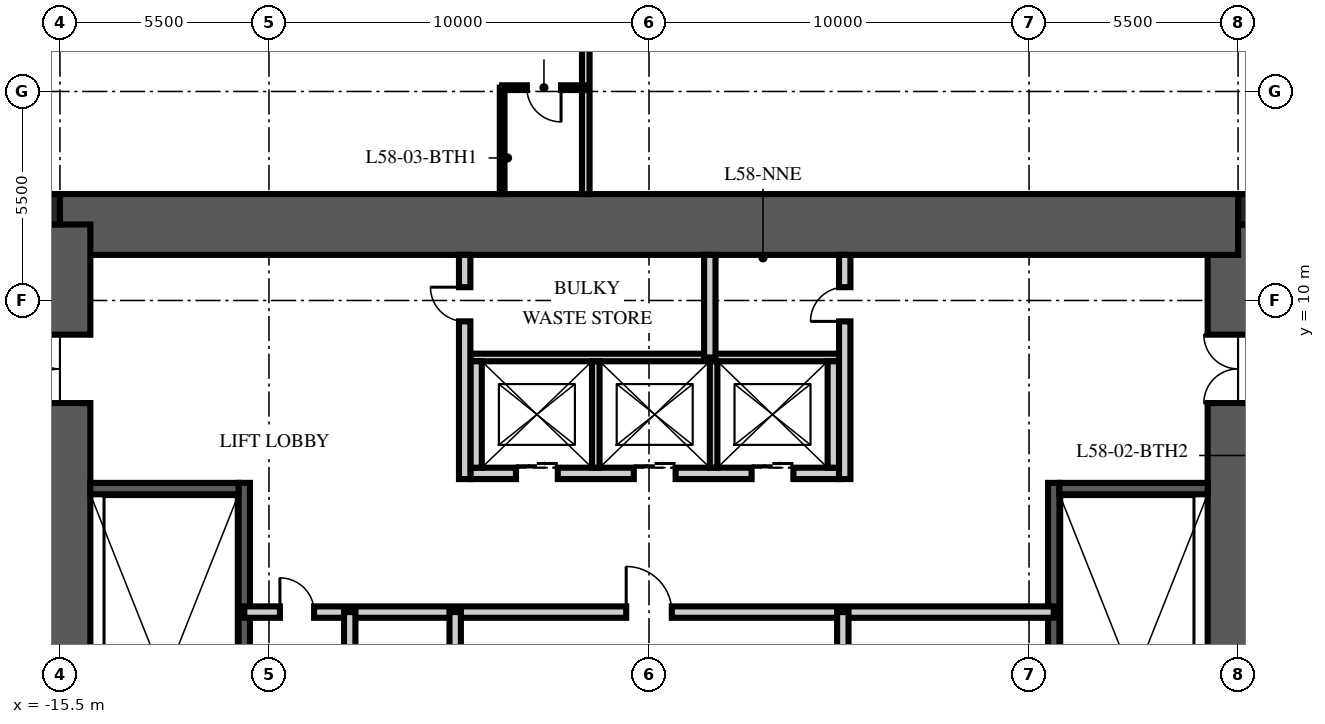
"""IFC4 building model, lengths in metres.
Left out: names, types, materials, properties, quantities, classifications, styles, units other than length and angle.
Written with IfcOpenShell. Run it as: python <this file> out.ifc"""

import sys

from ifc_helpers import new_model, si_unit, direction, frame, frame_2d, origin, origin_2d, place, context, subcontext, project, spatial, rectangle, extrude, element, fill, save


model = new_model("IFC4")
c1 = context("Model", 3, precision=1e-05, world=origin(), true_north=direction((0.0, 1.0)))
c2 = subcontext(c1, "Body", "Model", "MODEL_VIEW")
j1 = project(units=[si_unit("LENGTHUNIT", "METRE"), si_unit("PLANEANGLEUNIT", "RADIAN")], contexts=[c1])
p1 = place(None, origin())
s1 = spatial("IfcSite", under=j1, at=p1, CompositionType="ELEMENT")
p2 = place(p1, origin())
s2 = spatial("IfcBuilding", under=s1, at=p2, CompositionType="ELEMENT")
p3 = place(p2, frame((0.0, 0.0, 233.25)))
s3 = spatial("IfcBuildingStorey", under=s2, at=p3, CompositionType="ELEMENT", Elevation=233.25)
p4 = place(p3, frame((15.5, -12.0, -0.25), z_axis=(0.0, 0.0, 1.0), x_axis=(0.0, 1.0, 0.0)))
e1 = element("IfcWall", 1, at=p4, inside=s3, PredefinedType="SHEAR", context=c2, shape_type="SweptSolid", body=[
    extrude(rectangle(XDim=24.0, YDim=1.6, at=frame_2d((12.0, 0.0))), origin(), (0.0, 0.0, 1.0), 3.75),
])
p5 = place(p4, frame((3.2, 0.0, 0.25)))
e2 = element("IfcOpeningElement", 2, at=p5, cuts=e1, PredefinedType="OPENING", context=c2, shape_type="SweptSolid", body=[
    extrude(rectangle(XDim=1.2, YDim=2.1, at=frame_2d((0.6, 1.05))), frame((0.0, 0.81, 0.0), z_axis=(0.0, -1.0, 0.0), x_axis=(1.0, 0.0, 0.0)), (0.0, 0.0, 1.0), 1.62),
])
p6 = place(p4, frame((19.3, 0.0, 0.25)))
e3 = element("IfcOpeningElement", 3, at=p6, cuts=e1, PredefinedType="OPENING", context=c2, shape_type="SweptSolid", body=[
    extrude(rectangle(XDim=1.8, YDim=2.1, at=frame_2d((0.9, 1.05))), frame((0.0, 0.81, 0.0), z_axis=(0.0, -1.0, 0.0), x_axis=(1.0, 0.0, 0.0)), (0.0, 0.0, 1.0), 1.62),
])
p7 = place(p3, frame((-15.5, 12.0, -0.25), z_axis=(0.0, 0.0, 1.0), x_axis=(1.0, 0.0, 0.0)))
e4 = element("IfcWall", 4, at=p7, inside=s3, PredefinedType="SHEAR", context=c2, shape_type="SweptSolid", body=[
    extrude(rectangle(XDim=31.0, YDim=1.6, at=frame_2d((15.5, 0.0))), origin(), (0.0, 0.0, 1.0), 3.75),
])
p8 = place(p3, frame((-15.5, -12.0, -0.25), z_axis=(0.0, 0.0, 1.0), x_axis=(0.0, 1.0, 0.0)))
e5 = element("IfcWall", 5, at=p8, inside=s3, PredefinedType="SHEAR", context=c2, shape_type="SweptSolid", body=[
    extrude(rectangle(XDim=24.0, YDim=1.6, at=frame_2d((12.0, 0.0))), origin(), (0.0, 0.0, 1.0), 3.75),
])
p9 = place(p8, frame((3.2, 0.0, 0.25)))
e6 = element("IfcOpeningElement", 6, at=p9, cuts=e5, PredefinedType="OPENING", context=c2, shape_type="SweptSolid", body=[
    extrude(rectangle(XDim=1.2, YDim=2.1, at=frame_2d((0.6, 1.05))), frame((0.0, 0.81, 0.0), z_axis=(0.0, -1.0, 0.0), x_axis=(1.0, 0.0, 0.0)), (0.0, 0.0, 1.0), 1.62),
])
p10 = place(p8, frame((19.3, 0.0, 0.25)))
e7 = element("IfcOpeningElement", 7, at=p10, cuts=e5, PredefinedType="OPENING", context=c2, shape_type="SweptSolid", body=[
    extrude(rectangle(XDim=1.8, YDim=2.1, at=frame_2d((0.9, 1.05))), frame((0.0, 0.81, 0.0), z_axis=(0.0, -1.0, 0.0), x_axis=(1.0, 0.0, 0.0)), (0.0, 0.0, 1.0), 1.62),
])
for number, where, z_axis, x_axis in (
    (8, (15.9, 12.4, -0.25), (0.0, 0.0, 1.0), (1.0, 0.0, 0.0)),
    (9, (-15.9, 12.4, -0.25), (0.0, 0.0, 1.0), (1.0, 0.0, 0.0)),
):
    element("IfcColumn", number, at=place(p3, frame(where, z_axis=z_axis, x_axis=x_axis)), inside=s3, PredefinedType="COLUMN", context=c2, shape_type="SweptSolid", body=[
        extrude(rectangle(XDim=0.8, YDim=0.8, at=origin_2d()), origin(), (0.0, 0.0, 1.0), 3.75),
    ])
p11 = place(p3, frame((-10.65, -4.9, 0.0), z_axis=(0.0, 0.0, 1.0), x_axis=(0.0, 1.0, 0.0)))
e10 = element("IfcWall", 10, at=p11, inside=s3, PredefinedType="SOLIDWALL", context=c2, shape_type="SweptSolid", body=[
    extrude(rectangle(XDim=10.1, YDim=0.3, at=frame_2d((5.05, 0.0))), origin(), (0.0, 0.0, 1.0), 3.5),
])
p12 = place(p3, frame((-14.7, 5.05, 0.0), z_axis=(0.0, 0.0, 1.0), x_axis=(1.0, 0.0, 0.0)))
e11 = element("IfcWall", 11, at=p12, inside=s3, PredefinedType="SOLIDWALL", context=c2, shape_type="SweptSolid", body=[
    extrude(rectangle(XDim=3.9, YDim=0.3, at=frame_2d((1.95, 0.0))), origin(), (0.0, 0.0, 1.0), 3.5),
])
p13 = place(p3, frame((10.65, -4.9, 0.0), z_axis=(0.0, 0.0, 1.0), x_axis=(0.0, 1.0, 0.0)))
e12 = element("IfcWall", 12, at=p13, inside=s3, PredefinedType="SOLIDWALL", context=c2, shape_type="SweptSolid", body=[
    extrude(rectangle(XDim=10.1, YDim=0.3, at=frame_2d((5.05, 0.0))), origin(), (0.0, 0.0, 1.0), 3.5),
])
p14 = place(p3, frame((14.7, 5.05, 0.0), z_axis=(0.0, 0.0, 1.0), x_axis=(-1.0, 0.0, 0.0)))
e13 = element("IfcWall", 13, at=p14, inside=s3, PredefinedType="SOLIDWALL", context=c2, shape_type="SweptSolid", body=[
    extrude(rectangle(XDim=3.9, YDim=0.3, at=frame_2d((1.95, 0.0))), origin(), (0.0, 0.0, 1.0), 3.5),
])
p15 = place(p3, frame((-4.7, 5.45, 0.0), z_axis=(0.0, 0.0, 1.0), x_axis=(1.0, 0.0, 0.0)))
e14 = element("IfcWall", 14, at=p15, inside=s3, PredefinedType="PARTITIONING", context=c2, shape_type="SweptSolid", body=[
    extrude(rectangle(XDim=9.7, YDim=0.3, at=frame_2d((4.85, 0.0))), origin(), (0.0, 0.0, 1.0), 3.5),
])
p16 = place(p15, frame((1.2, 0.0, 0.0)))
e15 = element("IfcOpeningElement", 15, at=p16, cuts=e14, PredefinedType="OPENING", context=c2, shape_type="SweptSolid", body=[
    extrude(rectangle(XDim=1.1, YDim=2.1, at=frame_2d((0.55, 1.05))), frame((0.0, 0.16, 0.0), z_axis=(0.0, -1.0, 0.0), x_axis=(1.0, 0.0, 0.0)), (0.0, 0.0, 1.0), 0.32),
])
p17 = place(p15, frame((4.3, 0.0, 0.0)))
e16 = element("IfcOpeningElement", 16, at=p17, cuts=e14, PredefinedType="OPENING", context=c2, shape_type="SweptSolid", body=[
    extrude(rectangle(XDim=1.1, YDim=2.1, at=frame_2d((0.55, 1.05))), frame((0.0, 0.16, 0.0), z_axis=(0.0, -1.0, 0.0), x_axis=(1.0, 0.0, 0.0)), (0.0, 0.0, 1.0), 0.32),
])
p18 = place(p15, frame((7.4, 0.0, 0.0)))
e17 = element("IfcOpeningElement", 17, at=p18, cuts=e14, PredefinedType="OPENING", context=c2, shape_type="SweptSolid", body=[
    extrude(rectangle(XDim=1.1, YDim=2.1, at=frame_2d((0.55, 1.05))), frame((0.0, 0.16, 0.0), z_axis=(0.0, -1.0, 0.0), x_axis=(1.0, 0.0, 0.0)), (0.0, 0.0, 1.0), 0.32),
])
p19 = place(p3, frame((-4.7, 8.5, 0.0), z_axis=(0.0, 0.0, 1.0), x_axis=(1.0, 0.0, 0.0)))
e18 = element("IfcWall", 18, at=p19, inside=s3, PredefinedType="PARTITIONING", context=c2, shape_type="SweptSolid", body=[
    extrude(rectangle(XDim=9.7, YDim=0.2, at=frame_2d((4.85, 0.0))), origin(), (0.0, 0.0, 1.0), 3.5),
])
for number, where, z_axis, x_axis in (
    (19, (-4.55, 5.6, 0.0), (0.0, 0.0, 1.0), (0.0, 1.0, 0.0)),
    (20, (4.85, 5.6, 0.0), (0.0, 0.0, 1.0), (0.0, 1.0, 0.0)),
):
    element("IfcWall", number, at=place(p3, frame(where, z_axis=z_axis, x_axis=x_axis)), inside=s3, PredefinedType="PARTITIONING", context=c2, shape_type="SweptSolid", body=[
        extrude(rectangle(XDim=2.8, YDim=0.3, at=frame_2d((1.4, 0.0))), origin(), (0.0, 0.0, 1.0), 3.5),
    ])
for number, where, z_axis, x_axis in (
    (21, (-1.4, 5.6, 0.0), (0.0, 0.0, 1.0), (0.0, 1.0, 0.0)),
    (22, (1.7, 5.6, 0.0), (0.0, 0.0, 1.0), (0.0, 1.0, 0.0)),
):
    element("IfcWall", number, at=place(p3, frame(where, z_axis=z_axis, x_axis=x_axis)), inside=s3, PredefinedType="PARTITIONING", context=c2, shape_type="SweptSolid", body=[
        extrude(rectangle(XDim=2.8, YDim=0.2, at=frame_2d((1.4, 0.0))), origin(), (0.0, 0.0, 1.0), 3.5),
    ])
p20 = place(p3, frame((-10.65, 1.8, 0.0), z_axis=(0.0, 0.0, 1.0), x_axis=(1.0, 0.0, 0.0)))
e23 = element("IfcWall", 23, at=p20, inside=s3, PredefinedType="PARTITIONING", context=c2, shape_type="SweptSolid", body=[
    extrude(rectangle(XDim=21.3, YDim=0.3, at=frame_2d((10.65, 0.0))), origin(), (0.0, 0.0, 1.0), 3.5),
])
p21 = place(p20, frame((10.05, 0.0, 0.0)))
e24 = element("IfcOpeningElement", 24, at=p21, cuts=e23, PredefinedType="OPENING", context=c2, shape_type="SweptSolid", body=[
    extrude(rectangle(XDim=1.2, YDim=2.1, at=frame_2d((0.6, 1.05))), frame((0.0, 0.16, 0.0), z_axis=(0.0, -1.0, 0.0), x_axis=(1.0, 0.0, 0.0)), (0.0, 0.0, 1.0), 0.32),
])
p22 = place(p20, frame((0.938, 0.0, 0.0)))
e25 = element("IfcOpeningElement", 25, at=p22, cuts=e23, PredefinedType="OPENING", context=c2, shape_type="SweptSolid", body=[
    extrude(rectangle(XDim=0.9, YDim=2.1, at=frame_2d((0.45, 1.05))), frame((0.0, 0.16, 0.0), z_axis=(0.0, -1.0, 0.0), x_axis=(1.0, 0.0, 0.0)), (0.0, 0.0, 1.0), 0.32),
])
p23 = place(p3, frame((-5.1, -6.65, 0.0), z_axis=(0.0, 0.0, 1.0), x_axis=(0.0, 1.0, 0.0)))
e26 = element("IfcWall", 26, at=p23, inside=s3, PredefinedType="PARTITIONING", context=c2, shape_type="SweptSolid", body=[
    extrude(rectangle(XDim=8.45, YDim=0.3, at=frame_2d((4.225, 0.0))), origin(), (0.0, 0.0, 1.0), 3.5),
])
p24 = place(p23, frame((1.7, 0.0, 0.0)))
e27 = element("IfcOpeningElement", 27, at=p24, cuts=e26, PredefinedType="OPENING", context=c2, shape_type="SweptSolid", body=[
    extrude(rectangle(XDim=0.9, YDim=2.1, at=frame_2d((0.45, 1.05))), frame((0.0, 0.16, 0.0), z_axis=(0.0, -1.0, 0.0), x_axis=(1.0, 0.0, 0.0)), (0.0, 0.0, 1.0), 0.32),
])
p25 = place(p23, frame((5.925, 0.0, 0.0)))
e28 = element("IfcOpeningElement", 28, at=p25, cuts=e26, PredefinedType="OPENING", context=c2, shape_type="SweptSolid", body=[
    extrude(rectangle(XDim=0.9, YDim=2.1, at=frame_2d((0.45, 1.05))), frame((0.0, 0.16, 0.0), z_axis=(0.0, -1.0, 0.0), x_axis=(1.0, 0.0, 0.0)), (0.0, 0.0, 1.0), 0.32),
])
p26 = place(p3, frame((5.1, -6.65, 0.0), z_axis=(0.0, 0.0, 1.0), x_axis=(0.0, 1.0, 0.0)))
e29 = element("IfcWall", 29, at=p26, inside=s3, PredefinedType="PARTITIONING", context=c2, shape_type="SweptSolid", body=[
    extrude(rectangle(XDim=8.45, YDim=0.3, at=frame_2d((4.225, 0.0))), origin(), (0.0, 0.0, 1.0), 3.5),
])
p27 = place(p26, frame((1.866, 0.0, 0.0)))
e30 = element("IfcOpeningElement", 30, at=p27, cuts=e29, PredefinedType="OPENING", context=c2, shape_type="SweptSolid", body=[
    extrude(rectangle(XDim=0.9, YDim=2.1, at=frame_2d((0.45, 1.05))), frame((0.0, 0.16, 0.0), z_axis=(0.0, -1.0, 0.0), x_axis=(1.0, 0.0, 0.0)), (0.0, 0.0, 1.0), 0.32),
])
p28 = place(p26, frame((6.091, 0.0, 0.0)))
e31 = element("IfcOpeningElement", 31, at=p28, cuts=e29, PredefinedType="OPENING", context=c2, shape_type="SweptSolid", body=[
    extrude(rectangle(XDim=0.9, YDim=2.1, at=frame_2d((0.45, 1.05))), frame((0.0, 0.16, 0.0), z_axis=(0.0, -1.0, 0.0), x_axis=(1.0, 0.0, 0.0)), (0.0, 0.0, 1.0), 0.32),
])
p29 = place(p3, frame((-7.875, -2.35, 0.0), z_axis=(0.0, 0.0, 1.0), x_axis=(0.0, 1.0, 0.0)))
e32 = element("IfcWall", 32, at=p29, inside=s3, PredefinedType="PARTITIONING", context=c2, shape_type="SweptSolid", body=[
    extrude(rectangle(XDim=4.15, YDim=0.3, at=frame_2d((2.075, 0.0))), origin(), (0.0, 0.0, 1.0), 3.5),
])
p30 = place(p3, frame((-4.85, 5.3, 0.0), z_axis=(0.0, 0.0, 1.0), x_axis=(0.0, 1.0, 0.0)))
e33 = element("IfcWall", 33, at=p30, inside=s3, PredefinedType="PARTITIONING", context=c2, shape_type="SweptSolid", body=[
    extrude(rectangle(XDim=5.9, YDim=0.3, at=frame_2d((2.95, 0.0))), origin(), (0.0, 0.0, 1.0), 3.5),
])
p31 = place(p30, frame((4.15, 0.0, 0.0)))
e34 = element("IfcOpeningElement", 34, at=p31, cuts=e33, PredefinedType="OPENING", context=c2, shape_type="SweptSolid", body=[
    extrude(rectangle(XDim=0.9, YDim=2.1, at=frame_2d((0.45, 1.05))), frame((0.0, 0.16, 0.0), z_axis=(0.0, -1.0, 0.0), x_axis=(1.0, 0.0, 0.0)), (0.0, 0.0, 1.0), 0.32),
])
p32 = place(p3, frame((5.15, 5.3, 0.0), z_axis=(0.0, 0.0, 1.0), x_axis=(0.0, 1.0, 0.0)))
e35 = element("IfcWall", 35, at=p32, inside=s3, PredefinedType="PARTITIONING", context=c2, shape_type="SweptSolid", body=[
    extrude(rectangle(XDim=5.9, YDim=0.3, at=frame_2d((2.95, 0.0))), origin(), (0.0, 0.0, 1.0), 3.5),
])
p33 = place(p32, frame((4.15, 0.0, 0.0)))
e36 = element("IfcOpeningElement", 36, at=p33, cuts=e35, PredefinedType="OPENING", context=c2, shape_type="SweptSolid", body=[
    extrude(rectangle(XDim=0.9, YDim=2.1, at=frame_2d((0.45, 1.05))), frame((0.0, 0.16, 0.0), z_axis=(0.0, -1.0, 0.0), x_axis=(1.0, 0.0, 0.0)), (0.0, 0.0, 1.0), 0.32),
])
p34 = place(p3, frame((1.6, 8.5, 0.0), z_axis=(0.0, 0.0, 1.0), x_axis=(0.0, 1.0, 0.0)))
e37 = element("IfcWall", 37, at=p34, inside=s3, PredefinedType="PARTITIONING", context=c2, shape_type="SweptSolid", body=[
    extrude(rectangle(XDim=2.7, YDim=0.3, at=frame_2d((1.35, 0.0))), origin(), (0.0, 0.0, 1.0), 3.5),
])
p35 = place(p3, frame((-1.664, 12.8, 0.0), z_axis=(0.0, 0.0, 1.0), x_axis=(0.0, 1.0, 0.0)))
e38 = element("IfcWall", 38, at=p35, inside=s3, PredefinedType="PARTITIONING", context=c2, shape_type="SweptSolid", body=[
    extrude(rectangle(XDim=13.15, YDim=0.2, at=frame_2d((6.575, 0.0))), origin(), (0.0, 0.0, 1.0), 2.91),
])
p36 = place(p3, frame((-1.664, 15.6, 0.0), z_axis=(0.0, 0.0, 1.0), x_axis=(-1.0, 0.0, 0.0)))
e39 = element("IfcWall", 39, at=p36, inside=s3, PredefinedType="PARTITIONING", context=c2, shape_type="SweptSolid", body=[
    extrude(rectangle(XDim=2.2, YDim=0.125, at=frame_2d((1.1, 0.0))), origin(), (0.0, 0.0, 1.0), 3.5),
])
p37 = place(p36, frame((0.65, 0.0, 0.0)))
e40 = element("IfcOpeningElement", 40, at=p37, cuts=e39, PredefinedType="OPENING", context=c2, shape_type="SweptSolid", body=[
    extrude(rectangle(XDim=0.9, YDim=2.1, at=frame_2d((0.45, 1.05))), frame((0.0, 0.073, 0.0), z_axis=(0.0, -1.0, 0.0), x_axis=(1.0, 0.0, 0.0)), (0.0, 0.0, 1.0), 0.145),
])
p38 = place(p3, frame((-3.864, 12.8, 0.0), z_axis=(0.0, 0.0, 1.0), x_axis=(0.0, 1.0, 0.0)))
e41 = element("IfcWall", 41, at=p38, inside=s3, PredefinedType="PARTITIONING", context=c2, shape_type="SweptSolid", body=[
    extrude(rectangle(XDim=2.8, YDim=0.125, at=frame_2d((1.4, 0.0))), origin(), (0.0, 0.0, 1.0), 3.5),
])
p39 = place(p10, origin())
e42 = element("IfcDoor", 42, at=p39, inside=s3, OperationType="DOUBLE_DOOR_SINGLE_SWING", PredefinedType="DOOR", context=c2, shape_type="SweptSolid", body=[
    extrude(rectangle(XDim=1.8, YDim=2.1, at=frame_2d((0.9, 1.05))), frame((0.0, 0.025, 0.0), z_axis=(0.0, -1.0, 0.0), x_axis=(1.0, 0.0, 0.0)), (0.0, 0.0, 1.0), 0.05),
])
fill(e7, e42)
p40 = place(p6, origin())
e43 = element("IfcDoor", 43, at=p40, inside=s3, OperationType="DOUBLE_DOOR_SINGLE_SWING", PredefinedType="DOOR", context=c2, shape_type="SweptSolid", body=[
    extrude(rectangle(XDim=1.8, YDim=2.1, at=frame_2d((0.9, 1.05))), frame((0.0, 0.025, 0.0), z_axis=(0.0, -1.0, 0.0), x_axis=(1.0, 0.0, 0.0)), (0.0, 0.0, 1.0), 0.05),
])
fill(e3, e43)
p41 = place(p16, origin())
e44 = element("IfcDoor", 44, at=p41, inside=s3, OperationType="DOUBLE_DOOR_SLIDING", PredefinedType="DOOR", context=c2, shape_type="SweptSolid", body=[
    extrude(rectangle(XDim=1.1, YDim=2.1, at=frame_2d((0.55, 1.05))), frame((0.0, 0.025, 0.0), z_axis=(0.0, -1.0, 0.0), x_axis=(1.0, 0.0, 0.0)), (0.0, 0.0, 1.0), 0.05),
])
fill(e15, e44)
p42 = place(p17, origin())
e45 = element("IfcDoor", 45, at=p42, inside=s3, OperationType="DOUBLE_DOOR_SLIDING", PredefinedType="DOOR", context=c2, shape_type="SweptSolid", body=[
    extrude(rectangle(XDim=1.1, YDim=2.1, at=frame_2d((0.55, 1.05))), frame((0.0, 0.025, 0.0), z_axis=(0.0, -1.0, 0.0), x_axis=(1.0, 0.0, 0.0)), (0.0, 0.0, 1.0), 0.05),
])
fill(e16, e45)
p43 = place(p18, origin())
e46 = element("IfcDoor", 46, at=p43, inside=s3, OperationType="DOUBLE_DOOR_SLIDING", PredefinedType="DOOR", context=c2, shape_type="SweptSolid", body=[
    extrude(rectangle(XDim=1.1, YDim=2.1, at=frame_2d((0.55, 1.05))), frame((0.0, 0.025, 0.0), z_axis=(0.0, -1.0, 0.0), x_axis=(1.0, 0.0, 0.0)), (0.0, 0.0, 1.0), 0.05),
])
fill(e17, e46)
p44 = place(p21, origin())
e47 = element("IfcDoor", 47, at=p44, inside=s3, OperationType="SINGLE_SWING_LEFT", PredefinedType="DOOR", context=c2, shape_type="SweptSolid", body=[
    extrude(rectangle(XDim=1.2, YDim=2.1, at=frame_2d((0.6, 1.05))), frame((0.0, 0.025, 0.0), z_axis=(0.0, -1.0, 0.0), x_axis=(1.0, 0.0, 0.0)), (0.0, 0.0, 1.0), 0.05),
])
fill(e24, e47)
p45 = place(p22, origin())
e48 = element("IfcDoor", 48, at=p45, inside=s3, OperationType="SINGLE_SWING_LEFT", PredefinedType="DOOR", context=c2, shape_type="SweptSolid", body=[
    extrude(rectangle(XDim=0.9, YDim=2.1, at=frame_2d((0.45, 1.05))), frame((0.0, 0.025, 0.0), z_axis=(0.0, -1.0, 0.0), x_axis=(1.0, 0.0, 0.0)), (0.0, 0.0, 1.0), 0.05),
])
fill(e25, e48)
p46 = place(p31, origin())
e49 = element("IfcDoor", 49, at=p46, inside=s3, OperationType="SINGLE_SWING_RIGHT", PredefinedType="DOOR", context=c2, shape_type="SweptSolid", body=[
    extrude(rectangle(XDim=0.9, YDim=2.1, at=frame_2d((0.45, 1.05))), frame((0.0, 0.025, 0.0), z_axis=(0.0, -1.0, 0.0), x_axis=(1.0, 0.0, 0.0)), (0.0, 0.0, 1.0), 0.05),
])
fill(e34, e49)
p47 = place(p33, origin())
e50 = element("IfcDoor", 50, at=p47, inside=s3, OperationType="SINGLE_SWING_LEFT", PredefinedType="DOOR", context=c2, shape_type="SweptSolid", body=[
    extrude(rectangle(XDim=0.9, YDim=2.1, at=frame_2d((0.45, 1.05))), frame((0.0, 0.025, 0.0), z_axis=(0.0, -1.0, 0.0), x_axis=(1.0, 0.0, 0.0)), (0.0, 0.0, 1.0), 0.05),
])
fill(e36, e50)
p48 = place(p37, origin())
e51 = element("IfcDoor", 51, at=p48, inside=s3, OperationType="SINGLE_SWING_LEFT", PredefinedType="DOOR", context=c2, shape_type="SweptSolid", body=[
    extrude(rectangle(XDim=0.9, YDim=2.1, at=frame_2d((0.45, 1.05))), frame((0.0, 0.025, 0.0), z_axis=(0.0, -1.0, 0.0), x_axis=(1.0, 0.0, 0.0)), (0.0, 0.0, 1.0), 0.05),
])
fill(e40, e51)
save(model, sys.argv[1])
